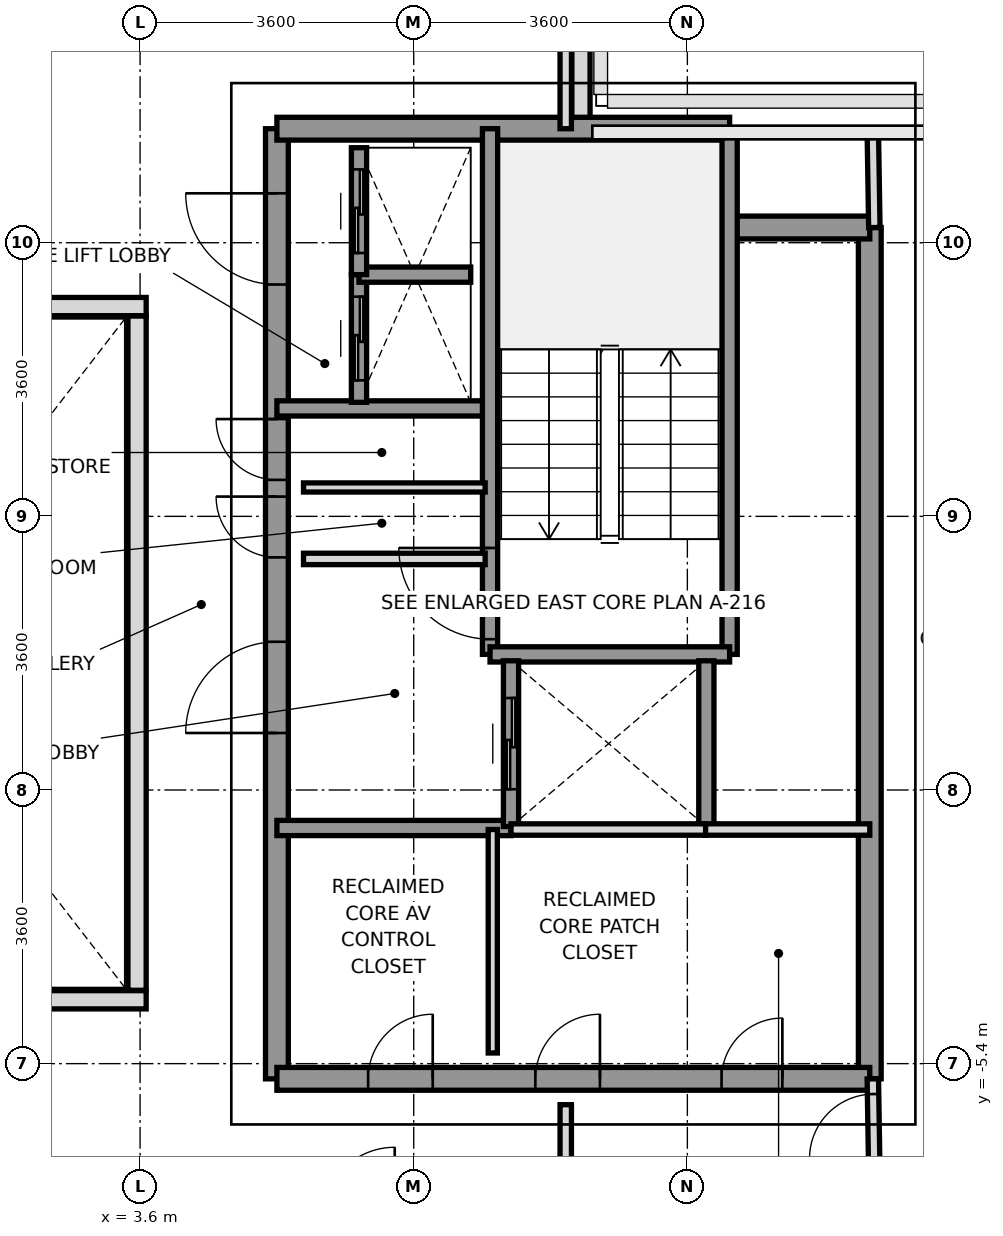
"""IFC4 building model, lengths in metres.
Left out: names, types, materials, properties, quantities, classifications, styles, units other than length and angle.
Written with IfcOpenShell. Run it as: python <this file> out.ifc"""

import sys

from ifc_helpers import new_model, si_unit, direction, frame, frame_2d, origin, place, context, subcontext, project, spatial, rectangle, extrude, source, transform, mapped, element, fill, save


model = new_model("IFC4")
c1 = context("Model", 3, precision=1e-05, world=origin(), true_north=direction((0.0, 1.0)))
c2 = subcontext(c1, "Body", "Model", "MODEL_VIEW")
j1 = project(units=[si_unit("LENGTHUNIT", "METRE"), si_unit("PLANEANGLEUNIT", "RADIAN")], contexts=[c1])
p1 = place(None, origin())
s1 = spatial("IfcSite", under=j1, at=p1, CompositionType="ELEMENT")
p2 = place(p1, origin())
s2 = spatial("IfcBuilding", under=s1, at=p2, CompositionType="ELEMENT")
p3 = place(p2, frame((0.0, 0.0, 226.8)))
s3 = spatial("IfcBuildingStorey", under=s2, at=p3, CompositionType="ELEMENT", Elevation=226.8)
p4 = place(p3, frame((9.4, 8.622, 0.0), z_axis=(0.0, 0.0, 1.0), x_axis=(0.0, -1.0, 0.0)))
e1 = element("IfcWall", 1, at=p4, inside=s3, PredefinedType="PARAPET", context=c2, shape_type="SweptSolid", body=[
    extrude(rectangle(XDim=1.669, YDim=0.24, at=frame_2d((0.834, 0.0))), origin(), (0.0, 0.0, 1.0), 1.15),
])
p5 = place(p3, frame((13.2, -5.6, 0.0), z_axis=(0.0, 0.0, 1.0), x_axis=(0.0, 1.0, 0.0)))
e2 = element("IfcWall", 2, at=p5, inside=s3, PredefinedType="SHEAR", context=c2, shape_type="SweptSolid", body=[
    extrude(rectangle(XDim=11.2, YDim=0.3, at=frame_2d((5.6, 0.0))), origin(), (0.0, 0.0, 1.0), 3.01),
])
p6 = place(p3, frame((5.4, -5.6, 0.0), z_axis=(0.0, 0.0, 1.0), x_axis=(0.0, 1.0, 0.0)))
e3 = element("IfcWall", 3, at=p6, inside=s3, PredefinedType="SHEAR", context=c2, shape_type="SweptSolid", body=[
    extrude(rectangle(XDim=12.5, YDim=0.3, at=frame_2d((6.25, 0.0))), origin(), (0.0, 0.0, 1.0), 3.01),
])
p7 = place(p6, frame((4.55, 0.0, 0.0)))
e4 = element("IfcOpeningElement", 4, at=p7, cuts=e3, PredefinedType="OPENING", context=c2, shape_type="SweptSolid", body=[
    extrude(rectangle(XDim=1.2, YDim=2.2, at=frame_2d((0.6, 1.1))), frame((0.0, 0.16, 0.0), z_axis=(0.0, -1.0, 0.0), x_axis=(1.0, 0.0, 0.0)), (0.0, 0.0, 1.0), 0.32),
])
p8 = place(p6, frame((10.45, 0.0, 0.0)))
e5 = element("IfcOpeningElement", 5, at=p8, cuts=e3, PredefinedType="OPENING", context=c2, shape_type="SweptSolid", body=[
    extrude(rectangle(XDim=1.2, YDim=2.2, at=frame_2d((0.6, 1.1))), frame((0.0, 0.16, 0.0), z_axis=(0.0, -1.0, 0.0), x_axis=(1.0, 0.0, 0.0)), (0.0, 0.0, 1.0), 0.32),
])
p9 = place(p6, frame((6.86, 0.0, 0.0)))
e6 = element("IfcOpeningElement", 6, at=p9, cuts=e3, PredefinedType="OPENING", context=c2, shape_type="SweptSolid", body=[
    extrude(rectangle(XDim=0.8, YDim=2.1, at=frame_2d((0.4, 1.05))), frame((0.0, 0.16, 0.0), z_axis=(0.0, -1.0, 0.0), x_axis=(1.0, 0.0, 0.0)), (0.0, 0.0, 1.0), 0.32),
])
p10 = place(p6, frame((7.88, 0.0, 0.0)))
e7 = element("IfcOpeningElement", 7, at=p10, cuts=e3, PredefinedType="OPENING", context=c2, shape_type="SweptSolid", body=[
    extrude(rectangle(XDim=0.8, YDim=2.1, at=frame_2d((0.4, 1.05))), frame((0.0, 0.16, 0.0), z_axis=(0.0, -1.0, 0.0), x_axis=(1.0, 0.0, 0.0)), (0.0, 0.0, 1.0), 0.32),
])
p11 = place(p3, frame((5.4, 6.9, 0.0), z_axis=(0.0, 0.0, 1.0), x_axis=(1.0, 0.0, 0.0)))
e8 = element("IfcWall", 8, at=p11, inside=s3, PredefinedType="SHEAR", context=c2, shape_type="SweptSolid", body=[
    extrude(rectangle(XDim=5.956, YDim=0.3, at=frame_2d((2.978, 0.0))), origin(), (0.0, 0.0, 1.0), 3.01),
])
p12 = place(p3, frame((11.356, 5.6, 0.0), z_axis=(0.0, 0.0, 1.0), x_axis=(1.0, 0.0, 0.0)))
e9 = element("IfcWall", 9, at=p12, inside=s3, PredefinedType="SHEAR", context=c2, shape_type="SweptSolid", body=[
    extrude(rectangle(XDim=1.844, YDim=0.3, at=frame_2d((0.922, 0.0))), origin(), (0.0, 0.0, 1.0), 3.01),
])
p13 = place(p3, frame((5.4, -5.6, 0.0), z_axis=(0.0, 0.0, 1.0), x_axis=(1.0, 0.0, 0.0)))
e10 = element("IfcWall", 10, at=p13, inside=s3, PredefinedType="SHEAR", context=c2, shape_type="SweptSolid", body=[
    extrude(rectangle(XDim=7.8, YDim=0.3, at=frame_2d((3.9, 0.0))), origin(), (0.0, 0.0, 1.0), 3.01),
])
p14 = place(p13, frame((5.85, 0.0, 0.0)))
e11 = element("IfcOpeningElement", 11, at=p14, cuts=e10, PredefinedType="OPENING", context=c2, shape_type="SweptSolid", body=[
    extrude(rectangle(XDim=0.8, YDim=2.1, at=frame_2d((0.4, 1.05))), frame((0.0, 0.16, 0.0), z_axis=(0.0, -1.0, 0.0), x_axis=(1.0, 0.0, 0.0)), (0.0, 0.0, 1.0), 0.32),
])
p15 = place(p13, frame((1.2, 0.0, 0.0)))
e12 = element("IfcOpeningElement", 12, at=p15, cuts=e10, PredefinedType="OPENING", context=c2, shape_type="SweptSolid", body=[
    extrude(rectangle(XDim=0.85, YDim=2.1, at=frame_2d((0.425, 1.05))), frame((0.0, 0.16, 0.0), z_axis=(0.0, -1.0, 0.0), x_axis=(1.0, 0.0, 0.0)), (0.0, 0.0, 1.0), 0.32),
])
p16 = place(p13, frame((3.4, 0.0, 0.0)))
e13 = element("IfcOpeningElement", 13, at=p16, cuts=e10, PredefinedType="OPENING", context=c2, shape_type="SweptSolid", body=[
    extrude(rectangle(XDim=0.85, YDim=2.1, at=frame_2d((0.425, 1.05))), frame((0.0, 0.16, 0.0), z_axis=(0.0, -1.0, 0.0), x_axis=(1.0, 0.0, 0.0)), (0.0, 0.0, 1.0), 0.32),
])
p17 = place(p3, frame((5.4, 3.22, 0.0), z_axis=(0.0, 0.0, 1.0), x_axis=(1.0, 0.0, 0.0)))
e14 = element("IfcWall", 14, at=p17, inside=s3, PredefinedType="SOLIDWALL", context=c2, shape_type="SweptSolid", body=[
    extrude(rectangle(XDim=2.78, YDim=0.2, at=frame_2d((1.39, 0.0))), origin(), (0.0, 0.0, 1.0), 3.01),
])
p18 = place(p3, frame((5.4, -2.3, 0.0), z_axis=(0.0, 0.0, 1.0), x_axis=(1.0, 0.0, 0.0)))
e15 = element("IfcWall", 15, at=p18, inside=s3, PredefinedType="SOLIDWALL", context=c2, shape_type="SweptSolid", body=[
    extrude(rectangle(XDim=3.08, YDim=0.2, at=frame_2d((1.54, 0.0))), origin(), (0.0, 0.0, 1.0), 3.01),
])
p19 = place(p3, frame((8.204, -0.016, 0.0), z_axis=(0.0, 0.0, 1.0), x_axis=(0.0, 1.0, 0.0)))
e16 = element("IfcWall", 16, at=p19, inside=s3, PredefinedType="SOLIDWALL", context=c2, shape_type="SweptSolid", body=[
    extrude(rectangle(XDim=6.916, YDim=0.2, at=frame_2d((3.458, 0.0))), origin(), (0.0, 0.0, 1.0), 3.01),
])
p20 = place(p19, frame((0.2, 0.0, 0.0)))
e17 = element("IfcOpeningElement", 17, at=p20, cuts=e16, PredefinedType="OPENING", context=c2, shape_type="SweptSolid", body=[
    extrude(rectangle(XDim=1.2, YDim=2.2, at=frame_2d((0.6, 1.1))), frame((0.0, 0.11, 0.0), z_axis=(0.0, -1.0, 0.0), x_axis=(1.0, 0.0, 0.0)), (0.0, 0.0, 1.0), 0.22),
])
p21 = place(p3, frame((11.356, -0.016, 0.0), z_axis=(0.0, 0.0, 1.0), x_axis=(0.0, 1.0, 0.0)))
e18 = element("IfcWall", 18, at=p21, inside=s3, PredefinedType="SOLIDWALL", context=c2, shape_type="SweptSolid", body=[
    extrude(rectangle(XDim=6.916, YDim=0.2, at=frame_2d((3.458, 0.0))), origin(), (0.0, 0.0, 1.0), 3.01),
])
p22 = place(p3, frame((8.204, -0.016, 0.0), z_axis=(0.0, 0.0, 1.0), x_axis=(1.0, 0.0, 0.0)))
e19 = element("IfcWall", 19, at=p22, inside=s3, PredefinedType="SOLIDWALL", context=c2, shape_type="SweptSolid", body=[
    extrude(rectangle(XDim=3.152, YDim=0.2, at=frame_2d((1.576, 0.0))), origin(), (0.0, 0.0, 1.0), 3.01),
])
p23 = place(p3, frame((8.48, -2.28, 0.0), z_axis=(0.0, 0.0, 1.0), x_axis=(0.0, 1.0, 0.0)))
e20 = element("IfcWall", 20, at=p23, inside=s3, PredefinedType="SOLIDWALL", context=c2, shape_type="SweptSolid", body=[
    extrude(rectangle(XDim=2.18, YDim=0.2, at=frame_2d((1.09, 0.0))), origin(), (0.0, 0.0, 1.0), 3.01),
])
p24 = place(p23, frame((0.49, 0.0, 0.0)))
e21 = element("IfcOpeningElement", 21, at=p24, cuts=e20, PredefinedType="OPENING", context=c2, shape_type="SweptSolid", body=[
    extrude(rectangle(XDim=1.2, YDim=2.2, at=frame_2d((0.6, 1.1))), frame((0.0, 0.11, 0.0), z_axis=(0.0, -1.0, 0.0), x_axis=(1.0, 0.0, 0.0)), (0.0, 0.0, 1.0), 0.22),
])
p25 = place(p3, frame((11.05, -2.28, 0.0), z_axis=(0.0, 0.0, 1.0), x_axis=(0.0, 1.0, 0.0)))
e22 = element("IfcWall", 22, at=p25, inside=s3, PredefinedType="SOLIDWALL", context=c2, shape_type="SweptSolid", body=[
    extrude(rectangle(XDim=2.18, YDim=0.2, at=frame_2d((1.09, 0.0))), origin(), (0.0, 0.0, 1.0), 3.01),
])
p26 = place(p3, frame((6.48, 3.3, 0.0), z_axis=(0.0, 0.0, 1.0), x_axis=(0.0, 1.0, 0.0)))
e23 = element("IfcWall", 23, at=p26, inside=s3, PredefinedType="SOLIDWALL", context=c2, shape_type="SweptSolid", body=[
    extrude(rectangle(XDim=1.68, YDim=0.2, at=frame_2d((0.84, 0.0))), origin(), (0.0, 0.0, 1.0), 3.01),
])
p27 = place(p26, frame((0.29, 0.0, 0.0)))
e24 = element("IfcOpeningElement", 24, at=p27, cuts=e23, PredefinedType="OPENING", context=c2, shape_type="SweptSolid", body=[
    extrude(rectangle(XDim=1.1, YDim=2.2, at=frame_2d((0.55, 1.1))), frame((0.0, 0.11, 0.0), z_axis=(0.0, -1.0, 0.0), x_axis=(1.0, 0.0, 0.0)), (0.0, 0.0, 1.0), 0.22),
])
p28 = place(p3, frame((6.48, 4.98, 0.0), z_axis=(0.0, 0.0, 1.0), x_axis=(1.0, 0.0, 0.0)))
e25 = element("IfcWall", 25, at=p28, inside=s3, PredefinedType="SOLIDWALL", context=c2, shape_type="SweptSolid", body=[
    extrude(rectangle(XDim=1.47, YDim=0.2, at=frame_2d((0.735, 0.0))), origin(), (0.0, 0.0, 1.0), 3.01),
])
p29 = place(p3, frame((6.48, 4.98, 0.0), z_axis=(0.0, 0.0, 1.0), x_axis=(0.0, 1.0, 0.0)))
e26 = element("IfcWall", 26, at=p29, inside=s3, PredefinedType="SOLIDWALL", context=c2, shape_type="SweptSolid", body=[
    extrude(rectangle(XDim=1.67, YDim=0.2, at=frame_2d((0.835, 0.0))), origin(), (0.0, 0.0, 1.0), 3.01),
])
p30 = place(p29, frame((0.285, 0.0, 0.0)))
e27 = element("IfcOpeningElement", 27, at=p30, cuts=e26, PredefinedType="OPENING", context=c2, shape_type="SweptSolid", body=[
    extrude(rectangle(XDim=1.1, YDim=2.2, at=frame_2d((0.55, 1.1))), frame((0.0, 0.11, 0.0), z_axis=(0.0, -1.0, 0.0), x_axis=(1.0, 0.0, 0.0)), (0.0, 0.0, 1.0), 0.22),
])
p31 = place(p3, frame((5.75, 1.24, 0.0), z_axis=(0.0, 0.0, 1.0), x_axis=(1.0, 0.0, 0.0)))
e28 = element("IfcWall", 28, at=p31, inside=s3, PredefinedType="PARTITIONING", context=c2, shape_type="SweptSolid", body=[
    extrude(rectangle(XDim=2.39, YDim=0.15, at=frame_2d((1.195, 0.0))), origin(), (0.0, 0.0, 1.0), 3.01),
])
p32 = place(p3, frame((5.75, 2.18, 0.0), z_axis=(0.0, 0.0, 1.0), x_axis=(1.0, 0.0, 0.0)))
e29 = element("IfcWall", 29, at=p32, inside=s3, PredefinedType="PARTITIONING", context=c2, shape_type="SweptSolid", body=[
    extrude(rectangle(XDim=2.39, YDim=0.12, at=frame_2d((1.195, 0.0))), origin(), (0.0, 0.0, 1.0), 3.01),
])
p33 = place(p3, frame((11.02, -2.32, 0.0), z_axis=(0.0, 0.0, 1.0), x_axis=(1.0, 0.0, 0.0)))
e30 = element("IfcWall", 30, at=p33, inside=s3, PredefinedType="PARTITIONING", context=c2, shape_type="SweptSolid", body=[
    extrude(rectangle(XDim=2.18, YDim=0.15, at=frame_2d((1.09, 0.0))), origin(), (0.0, 0.0, 1.0), 3.01),
])
p34 = place(p3, frame((8.24, -5.26, 0.0), z_axis=(0.0, 0.0, 1.0), x_axis=(0.0, 1.0, 0.0)))
e31 = element("IfcWall", 31, at=p34, inside=s3, PredefinedType="PARTITIONING", context=c2, shape_type="SweptSolid", body=[
    extrude(rectangle(XDim=2.94, YDim=0.12, at=frame_2d((1.47, 0.0))), origin(), (0.0, 0.0, 1.0), 3.01),
])
p35 = place(p3, frame((8.48, -2.32, 0.0), z_axis=(0.0, 0.0, 1.0), x_axis=(1.0, 0.0, 0.0)))
e32 = element("IfcWall", 32, at=p35, inside=s3, PredefinedType="PARTITIONING", context=c2, shape_type="SweptSolid", body=[
    extrude(rectangle(XDim=2.56, YDim=0.15, at=frame_2d((1.28, 0.0))), origin(), (0.0, 0.0, 1.0), 3.01),
])
p36 = place(p3, frame((9.2, 6.9, 0.0), z_axis=(0.0, 0.0, 1.0), x_axis=(0.0, 1.0, 0.0)))
e33 = element("IfcWall", 33, at=p36, inside=s3, PredefinedType="PARTITIONING", context=c2, shape_type="SweptSolid", body=[
    extrude(rectangle(XDim=3.38, YDim=0.15, at=frame_2d((1.69, 0.0))), origin(), (0.0, 0.0, 1.0), 2.61),
])
p37 = place(p3, frame((9.2, -10.28, 0.0), z_axis=(0.0, 0.0, 1.0), x_axis=(0.0, 1.0, 0.0)))
e34 = element("IfcWall", 34, at=p37, inside=s3, PredefinedType="PARTITIONING", context=c2, shape_type="SweptSolid", body=[
    extrude(rectangle(XDim=4.34, YDim=0.15, at=frame_2d((2.17, 0.0))), origin(), (0.0, 0.0, 1.0), 2.61),
])
p38 = place(p3, frame((13.26, 5.6, 0.0), z_axis=(0.0, 0.0, 1.0), x_axis=(-0.016013571389, 0.999871774545, 0.0)))
e35 = element("IfcWall", 35, at=p38, inside=s3, PredefinedType="PARTITIONING", context=c2, shape_type="SweptSolid", body=[
    extrude(rectangle(XDim=1.25, YDim=0.15, at=frame_2d((0.625, 0.0))), origin(), (0.0, 0.0, 1.0), 3.01),
])
p39 = place(p3, frame((13.26, -6.85, 0.0), z_axis=(0.0, 0.0, 1.0), x_axis=(-0.016013571389, 0.999871774545, 0.0)))
e36 = element("IfcWall", 36, at=p39, inside=s3, PredefinedType="PARTITIONING", context=c2, shape_type="SweptSolid", body=[
    extrude(rectangle(XDim=1.25, YDim=0.15, at=frame_2d((0.625, 0.0))), origin(), (0.0, 0.0, 1.0), 3.01),
])
p40 = place(p39, frame((0.2, 0.0, 0.0)))
e37 = element("IfcOpeningElement", 37, at=p40, cuts=e36, PredefinedType="OPENING", context=c2, shape_type="SweptSolid", body=[
    extrude(rectangle(XDim=0.85, YDim=2.1, at=frame_2d((0.425, 1.05))), frame((0.0, 0.085, 0.0), z_axis=(0.0, -1.0, 0.0), x_axis=(1.0, 0.0, 0.0)), (0.0, 0.0, 1.0), 0.17),
])
for number, where, z_axis, x_axis in (
    (38, (-3.68, -4.56, 0.0), (0.0, 0.0, 1.0), (1.0, 0.0, 0.0)),
    (39, (-3.68, 4.56, 0.0), (0.0, 0.0, 1.0), (1.0, 0.0, 0.0)),
):
    element("IfcWall", number, at=place(p3, frame(where, z_axis=z_axis, x_axis=x_axis)), inside=s3, PredefinedType="PARAPET", context=c2, shape_type="SweptSolid", body=[
        extrude(rectangle(XDim=7.36, YDim=0.24, at=frame_2d((3.68, 0.0))), origin(), (0.0, 0.0, 1.0), 1.15),
    ])
p41 = place(p3, frame((3.56, -4.435, 0.0), z_axis=(0.0, 0.0, 1.0), x_axis=(0.0, 1.0, 0.0)))
e40 = element("IfcWall", 40, at=p41, inside=s3, PredefinedType="PARAPET", context=c2, shape_type="SweptSolid", body=[
    extrude(rectangle(XDim=8.87, YDim=0.24, at=frame_2d((4.435, 0.0))), origin(), (0.0, 0.0, 1.0), 1.15),
])
m1 = source(origin(), c2, "Body", "SweptSolid", [
    extrude(rectangle(XDim=1.2, YDim=2.2, at=frame_2d((0.6, 1.1))), frame((0.0, 0.025, 0.0), z_axis=(0.0, -1.0, 0.0), x_axis=(1.0, 0.0, 0.0)), (0.0, 0.0, 1.0), 0.05),
])
p42 = place(p20, origin())
e41 = element("IfcDoor", 41, at=p42, inside=s3, OperationType="SINGLE_SWING_RIGHT", PredefinedType="DOOR", context=c2, shape_type="MappedRepresentation", body=[
    mapped(m1, transform((0.0, 0.0, 0.0), x_axis=(1.0, 0.0, 0.0), y_axis=(0.0, 1.0, 0.0), z_axis=(0.0, 0.0, 1.0), scale=1.0)),
])
fill(e17, e41)
p43 = place(p7, origin())
e42 = element("IfcDoor", 42, at=p43, inside=s3, OperationType="SINGLE_SWING_LEFT", PredefinedType="DOOR", context=c2, shape_type="MappedRepresentation", body=[
    mapped(m1, transform((0.0, 0.0, 0.0), x_axis=(1.0, 0.0, 0.0), y_axis=(0.0, 1.0, 0.0), z_axis=(0.0, 0.0, 1.0), scale=1.0)),
])
fill(e4, e42)
p44 = place(p8, origin())
e43 = element("IfcDoor", 43, at=p44, inside=s3, OperationType="SINGLE_SWING_RIGHT", PredefinedType="DOOR", context=c2, shape_type="MappedRepresentation", body=[
    mapped(m1, transform((0.0, 0.0, 0.0), x_axis=(1.0, 0.0, 0.0), y_axis=(0.0, 1.0, 0.0), z_axis=(0.0, 0.0, 1.0), scale=1.0)),
])
fill(e5, e43)
m2 = source(origin(), c2, "Body", "SweptSolid", [
    extrude(rectangle(XDim=0.8, YDim=2.1, at=frame_2d((0.4, 1.05))), frame((0.0, 0.025, 0.0), z_axis=(0.0, -1.0, 0.0), x_axis=(1.0, 0.0, 0.0)), (0.0, 0.0, 1.0), 0.05),
])
p45 = place(p9, origin())
e44 = element("IfcDoor", 44, at=p45, inside=s3, OperationType="SINGLE_SWING_RIGHT", PredefinedType="DOOR", context=c2, shape_type="MappedRepresentation", body=[
    mapped(m2, transform((0.0, 0.0, 0.0), x_axis=(1.0, 0.0, 0.0), y_axis=(0.0, 1.0, 0.0), z_axis=(0.0, 0.0, 1.0), scale=1.0)),
])
fill(e6, e44)
p46 = place(p10, origin())
e45 = element("IfcDoor", 45, at=p46, inside=s3, OperationType="SINGLE_SWING_RIGHT", PredefinedType="DOOR", context=c2, shape_type="MappedRepresentation", body=[
    mapped(m2, transform((0.0, 0.0, 0.0), x_axis=(1.0, 0.0, 0.0), y_axis=(0.0, 1.0, 0.0), z_axis=(0.0, 0.0, 1.0), scale=1.0)),
])
fill(e7, e45)
p47 = place(p14, origin())
e46 = element("IfcDoor", 46, at=p47, inside=s3, OperationType="SINGLE_SWING_RIGHT", PredefinedType="DOOR", context=c2, shape_type="MappedRepresentation", body=[
    mapped(m2, transform((0.0, 0.0, 0.0), x_axis=(1.0, 0.0, 0.0), y_axis=(0.0, 1.0, 0.0), z_axis=(0.0, 0.0, 1.0), scale=1.0)),
])
fill(e11, e46)
m3 = source(origin(), c2, "Body", "SweptSolid", [
    extrude(rectangle(XDim=0.85, YDim=2.1, at=frame_2d((0.425, 1.05))), frame((0.0, 0.025, 0.0), z_axis=(0.0, -1.0, 0.0), x_axis=(1.0, 0.0, 0.0)), (0.0, 0.0, 1.0), 0.05),
])
p48 = place(p15, origin())
e47 = element("IfcDoor", 47, at=p48, inside=s3, OperationType="SINGLE_SWING_RIGHT", PredefinedType="DOOR", context=c2, shape_type="MappedRepresentation", body=[
    mapped(m3, transform((0.0, 0.0, 0.0), x_axis=(1.0, 0.0, 0.0), y_axis=(0.0, 1.0, 0.0), z_axis=(0.0, 0.0, 1.0), scale=1.0)),
])
fill(e12, e47)
p49 = place(p16, origin())
e48 = element("IfcDoor", 48, at=p49, inside=s3, OperationType="SINGLE_SWING_RIGHT", PredefinedType="DOOR", context=c2, shape_type="MappedRepresentation", body=[
    mapped(m3, transform((0.0, 0.0, 0.0), x_axis=(1.0, 0.0, 0.0), y_axis=(0.0, 1.0, 0.0), z_axis=(0.0, 0.0, 1.0), scale=1.0)),
])
fill(e13, e48)
p50 = place(p24, origin())
e49 = element("IfcDoor", 49, at=p50, inside=s3, OperationType="SLIDING_TO_RIGHT", PredefinedType="DOOR", context=c2, shape_type="MappedRepresentation", body=[
    mapped(m1, transform((0.0, 0.0, 0.0), x_axis=(1.0, 0.0, 0.0), y_axis=(0.0, 1.0, 0.0), z_axis=(0.0, 0.0, 1.0), scale=1.0)),
])
fill(e21, e49)
m4 = source(origin(), c2, "Body", "SweptSolid", [
    extrude(rectangle(XDim=1.1, YDim=2.2, at=frame_2d((0.55, 1.1))), frame((0.0, 0.025, 0.0), z_axis=(0.0, -1.0, 0.0), x_axis=(1.0, 0.0, 0.0)), (0.0, 0.0, 1.0), 0.05),
])
p51 = place(p27, origin())
e50 = element("IfcDoor", 50, at=p51, inside=s3, OperationType="SLIDING_TO_LEFT", PredefinedType="DOOR", context=c2, shape_type="MappedRepresentation", body=[
    mapped(m4, transform((0.0, 0.0, 0.0), x_axis=(1.0, 0.0, 0.0), y_axis=(0.0, 1.0, 0.0), z_axis=(0.0, 0.0, 1.0), scale=1.0)),
])
fill(e24, e50)
p52 = place(p30, origin())
e51 = element("IfcDoor", 51, at=p52, inside=s3, OperationType="SLIDING_TO_LEFT", PredefinedType="DOOR", context=c2, shape_type="MappedRepresentation", body=[
    mapped(m4, transform((0.0, 0.0, 0.0), x_axis=(1.0, 0.0, 0.0), y_axis=(0.0, 1.0, 0.0), z_axis=(0.0, 0.0, 1.0), scale=1.0)),
])
fill(e27, e51)
p53 = place(p40, origin())
e52 = element("IfcDoor", 52, at=p53, inside=s3, OperationType="SINGLE_SWING_LEFT", PredefinedType="DOOR", context=c2, shape_type="MappedRepresentation", body=[
    mapped(m3, transform((0.0, 0.0, 0.0), x_axis=(1.0, 0.0, 0.0), y_axis=(0.0, 1.0, 0.0), z_axis=(0.0, 0.0, 1.0), scale=1.0)),
])
fill(e37, e52)
save(model, sys.argv[1])
